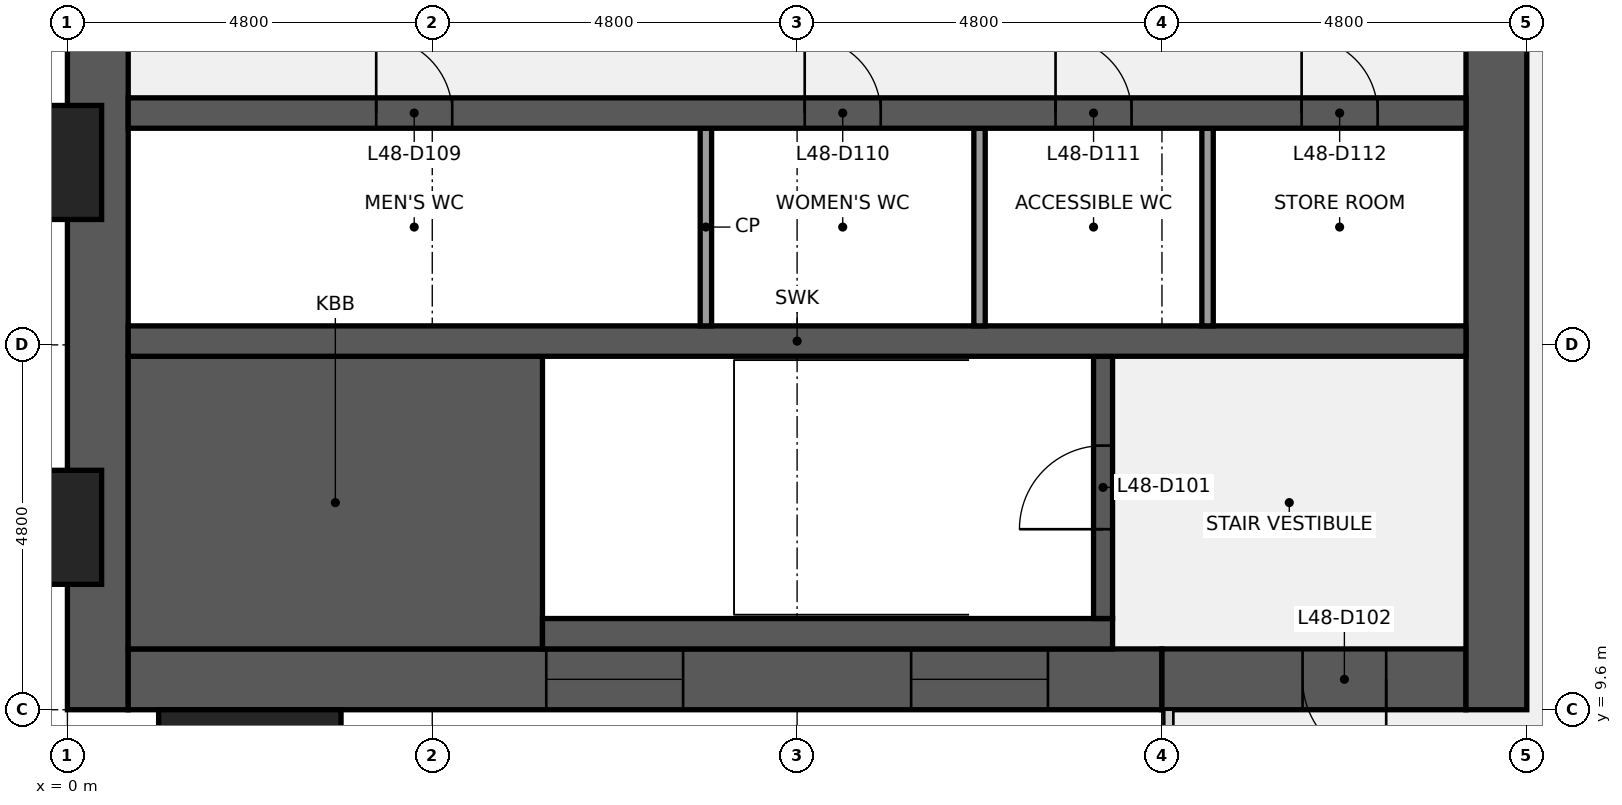
"""IFC4 building model, lengths in metres.
Left out: names, types, materials, properties, quantities, classifications, styles, units other than length and angle.
Written with IfcOpenShell. Run it as: python <this file> out.ifc"""

import sys

from ifc_helpers import new_model, si_unit, direction, frame, frame_2d, origin, origin_2d, place, context, subcontext, project, spatial, rectangle, extrude, element, fill, save


model = new_model("IFC4")
c1 = context("Model", 3, precision=1e-05, world=origin(), true_north=direction((0.0, 1.0)))
c2 = subcontext(c1, "Body", "Model", "MODEL_VIEW")
j1 = project(units=[si_unit("LENGTHUNIT", "METRE"), si_unit("PLANEANGLEUNIT", "RADIAN")], contexts=[c1])
p1 = place(None, origin())
s1 = spatial("IfcSite", under=j1, at=p1, CompositionType="ELEMENT")
p2 = place(p1, origin())
s2 = spatial("IfcBuilding", under=s1, at=p2, CompositionType="ELEMENT")
p3 = place(p2, frame((0.0, 0.0, 221.2)))
s3 = spatial("IfcBuildingStorey", under=s2, at=p3, CompositionType="ELEMENT", Elevation=221.2)
p4 = place(p3, frame((0.4, 9.6, 0.0), z_axis=(0.0, 0.0, 1.0), x_axis=(0.0, 1.0, 0.0)))
e1 = element("IfcWall", 1, at=p4, inside=s3, PredefinedType="SHEAR", context=c2, shape_type="SweptSolid", body=[
    extrude(rectangle(XDim=28.8, YDim=0.8, at=frame_2d((14.4, 0.0))), origin(), (0.0, 0.0, 1.0), 3.84),
])
p5 = place(p4, frame((8.85, 0.0, 0.9)))
e2 = element("IfcOpeningElement", 2, at=p5, cuts=e1, PredefinedType="OPENING", context=c2, shape_type="SweptSolid", body=[
    extrude(rectangle(XDim=1.5, YDim=1.5, at=frame_2d((0.75, 0.75))), frame((0.0, 0.41, 0.0), z_axis=(0.0, -1.0, 0.0), x_axis=(1.0, 0.0, 0.0)), (0.0, 0.0, 1.0), 0.82),
])
p6 = place(p4, frame((18.45, 0.0, 0.9)))
e3 = element("IfcOpeningElement", 3, at=p6, cuts=e1, PredefinedType="OPENING", context=c2, shape_type="SweptSolid", body=[
    extrude(rectangle(XDim=1.5, YDim=1.5, at=frame_2d((0.75, 0.75))), frame((0.0, 0.41, 0.0), z_axis=(0.0, -1.0, 0.0), x_axis=(1.0, 0.0, 0.0)), (0.0, 0.0, 1.0), 0.82),
])
p7 = place(p3, frame((14.4, 10.0, 0.0), z_axis=(0.0, 0.0, 1.0), x_axis=(-1.0, 0.0, 0.0)))
e4 = element("IfcWall", 4, at=p7, inside=s3, PredefinedType="SHEAR", context=c2, shape_type="SweptSolid", body=[
    extrude(rectangle(XDim=13.6, YDim=0.8, at=frame_2d((6.8, 0.0))), origin(), (0.0, 0.0, 1.0), 3.84),
])
p8 = place(p7, frame((6.3, 0.0, 0.9)))
e5 = element("IfcOpeningElement", 5, at=p8, cuts=e4, PredefinedType="OPENING", context=c2, shape_type="SweptSolid", body=[
    extrude(rectangle(XDim=1.8, YDim=1.5, at=frame_2d((0.9, 0.75))), frame((0.0, 0.41, 0.0), z_axis=(0.0, -1.0, 0.0), x_axis=(1.0, 0.0, 0.0)), (0.0, 0.0, 1.0), 0.82),
])
p9 = place(p7, frame((1.5, 0.0, 0.9)))
e6 = element("IfcOpeningElement", 6, at=p9, cuts=e4, PredefinedType="OPENING", context=c2, shape_type="SweptSolid", body=[
    extrude(rectangle(XDim=1.8, YDim=1.5, at=frame_2d((0.9, 0.75))), frame((0.0, 0.41, 0.0), z_axis=(0.0, -1.0, 0.0), x_axis=(1.0, 0.0, 0.0)), (0.0, 0.0, 1.0), 0.82),
])
p10 = place(p3, frame((18.4, 10.0, 0.0), z_axis=(0.0, 0.0, 1.0), x_axis=(-1.0, 0.0, 0.0)))
e7 = element("IfcWall", 7, at=p10, inside=s3, PredefinedType="SHEAR", context=c2, shape_type="SweptSolid", body=[
    extrude(rectangle(XDim=4.0, YDim=0.8, at=frame_2d((2.0, 0.0))), origin(), (0.0, 0.0, 1.0), 3.84),
])
p11 = place(p10, frame((1.05, 0.0, 0.0)))
e8 = element("IfcOpeningElement", 8, at=p11, cuts=e7, PredefinedType="OPENING", context=c2, shape_type="SweptSolid", body=[
    extrude(rectangle(XDim=1.1, YDim=2.1, at=frame_2d((0.55, 1.05))), frame((0.0, 0.41, 0.0), z_axis=(0.0, -1.0, 0.0), x_axis=(1.0, 0.0, 0.0)), (0.0, 0.0, 1.0), 0.82),
])
p12 = place(p3, frame((18.8, 38.4, 0.0), z_axis=(0.0, 0.0, 1.0), x_axis=(0.0, -1.0, 0.0)))
e9 = element("IfcWall", 9, at=p12, inside=s3, PredefinedType="SHEAR", context=c2, shape_type="SweptSolid", body=[
    extrude(rectangle(XDim=28.8, YDim=0.8, at=frame_2d((14.4, 0.0))), origin(), (0.0, 0.0, 1.0), 3.84),
])
p13 = place(p12, frame((18.3, 0.0, 0.0)))
e10 = element("IfcOpeningElement", 10, at=p13, cuts=e9, PredefinedType="OPENING", context=c2, shape_type="SweptSolid", body=[
    extrude(rectangle(XDim=1.8, YDim=2.1, at=frame_2d((0.9, 1.05))), frame((0.0, 0.41, 0.0), z_axis=(0.0, -1.0, 0.0), x_axis=(1.0, 0.0, 0.0)), (0.0, 0.0, 1.0), 0.82),
])
p14 = place(p12, frame((8.7, 0.0, 0.0)))
e11 = element("IfcOpeningElement", 11, at=p14, cuts=e9, PredefinedType="OPENING", context=c2, shape_type="SweptSolid", body=[
    extrude(rectangle(XDim=1.8, YDim=2.1, at=frame_2d((0.9, 1.05))), frame((0.0, 0.41, 0.0), z_axis=(0.0, -1.0, 0.0), x_axis=(1.0, 0.0, 0.0)), (0.0, 0.0, 1.0), 0.82),
])
p15 = place(p3, frame((0.8, 12.325, 0.0), z_axis=(0.0, 0.0, 1.0), x_axis=(1.0, 0.0, 0.0)))
e12 = element("IfcWall", 12, at=p15, inside=s3, PredefinedType="SHEAR", context=c2, shape_type="SweptSolid", body=[
    extrude(rectangle(XDim=5.45, YDim=3.85, at=frame_2d((2.725, 0.0))), origin(), (0.0, 0.0, 1.0), 3.84),
])
p16 = place(p3, frame((6.25, 10.6, 0.0), z_axis=(0.0, 0.0, 1.0), x_axis=(1.0, 0.0, 0.0)))
e13 = element("IfcWall", 13, at=p16, inside=s3, PredefinedType="SHEAR", context=c2, shape_type="SweptSolid", body=[
    extrude(rectangle(XDim=7.5, YDim=0.4, at=frame_2d((3.75, 0.0))), origin(), (0.0, 0.0, 1.0), 3.84),
])
p17 = place(p3, frame((13.625, 10.8, 0.0), z_axis=(0.0, 0.0, 1.0), x_axis=(0.0, 1.0, 0.0)))
e14 = element("IfcWall", 14, at=p17, inside=s3, PredefinedType="SHEAR", context=c2, shape_type="SweptSolid", body=[
    extrude(rectangle(XDim=3.45, YDim=0.25, at=frame_2d((1.725, 0.0))), origin(), (0.0, 0.0, 1.0), 3.84),
])
p18 = place(p17, frame((1.175, 0.0, 0.0)))
e15 = element("IfcOpeningElement", 15, at=p18, cuts=e14, PredefinedType="OPENING", context=c2, shape_type="SweptSolid", body=[
    extrude(rectangle(XDim=1.1, YDim=2.1, at=frame_2d((0.55, 1.05))), frame((0.0, 0.135, 0.0), z_axis=(0.0, -1.0, 0.0), x_axis=(1.0, 0.0, 0.0)), (0.0, 0.0, 1.0), 0.27),
])
p19 = place(p3, frame((0.8, 14.45, 0.0), z_axis=(0.0, 0.0, 1.0), x_axis=(1.0, 0.0, 0.0)))
e16 = element("IfcWall", 16, at=p19, inside=s3, PredefinedType="SHEAR", context=c2, shape_type="SweptSolid", body=[
    extrude(rectangle(XDim=17.6, YDim=0.4, at=frame_2d((8.8, 0.0))), origin(), (0.0, 0.0, 1.0), 3.84),
])
for number, where, z_axis, x_axis in (
    (17, (8.4, 14.65, 0.0), (0.0, 0.0, 1.0), (0.0, 1.0, 0.0)),
    (18, (12.0, 14.65, 0.0), (0.0, 0.0, 1.0), (0.0, 1.0, 0.0)),
    (19, (15.0, 14.65, 0.0), (0.0, 0.0, 1.0), (0.0, 1.0, 0.0)),
):
    element("IfcWall", number, at=place(p3, frame(where, z_axis=z_axis, x_axis=x_axis)), inside=s3, PredefinedType="PARTITIONING", context=c2, shape_type="SweptSolid", body=[
        extrude(rectangle(XDim=2.6, YDim=0.15, at=frame_2d((1.3, 0.0))), origin(), (0.0, 0.0, 1.0), 3.84),
    ])
p20 = place(p3, frame((0.8, 17.45, 0.0), z_axis=(0.0, 0.0, 1.0), x_axis=(1.0, 0.0, 0.0)))
e20 = element("IfcWall", 20, at=p20, inside=s3, PredefinedType="SHEAR", context=c2, shape_type="SweptSolid", body=[
    extrude(rectangle(XDim=17.6, YDim=0.4, at=frame_2d((8.8, 0.0))), origin(), (0.0, 0.0, 1.0), 3.84),
])
p21 = place(p20, frame((3.262, 0.0, 0.0)))
e21 = element("IfcOpeningElement", 21, at=p21, cuts=e20, PredefinedType="OPENING", context=c2, shape_type="SweptSolid", body=[
    extrude(rectangle(XDim=1.0, YDim=2.1, at=frame_2d((0.5, 1.05))), frame((0.0, 0.21, 0.0), z_axis=(0.0, -1.0, 0.0), x_axis=(1.0, 0.0, 0.0)), (0.0, 0.0, 1.0), 0.42),
])
p22 = place(p20, frame((8.9, 0.0, 0.0)))
e22 = element("IfcOpeningElement", 22, at=p22, cuts=e20, PredefinedType="OPENING", context=c2, shape_type="SweptSolid", body=[
    extrude(rectangle(XDim=1.0, YDim=2.1, at=frame_2d((0.5, 1.05))), frame((0.0, 0.21, 0.0), z_axis=(0.0, -1.0, 0.0), x_axis=(1.0, 0.0, 0.0)), (0.0, 0.0, 1.0), 0.42),
])
p23 = place(p20, frame((12.2, 0.0, 0.0)))
e23 = element("IfcOpeningElement", 23, at=p23, cuts=e20, PredefinedType="OPENING", context=c2, shape_type="SweptSolid", body=[
    extrude(rectangle(XDim=1.0, YDim=2.1, at=frame_2d((0.5, 1.05))), frame((0.0, 0.21, 0.0), z_axis=(0.0, -1.0, 0.0), x_axis=(1.0, 0.0, 0.0)), (0.0, 0.0, 1.0), 0.42),
])
p24 = place(p20, frame((15.438, 0.0, 0.0)))
e24 = element("IfcOpeningElement", 24, at=p24, cuts=e20, PredefinedType="OPENING", context=c2, shape_type="SweptSolid", body=[
    extrude(rectangle(XDim=1.0, YDim=2.1, at=frame_2d((0.5, 1.05))), frame((0.0, 0.21, 0.0), z_axis=(0.0, -1.0, 0.0), x_axis=(1.0, 0.0, 0.0)), (0.0, 0.0, 1.0), 0.42),
])
for number, where, z_axis, x_axis in (
    (25, (-0.75, 12.0, 0.0), (0.0, 0.0, 1.0), (0.0, 1.0, 0.0)),
    (26, (-0.75, 16.8, 0.0), (0.0, 0.0, 1.0), (0.0, 1.0, 0.0)),
    (27, (2.4, 8.85, 0.0), (0.0, 0.0, 1.0), (1.0, 0.0, 0.0)),
):
    element("IfcColumn", number, at=place(p3, frame(where, z_axis=z_axis, x_axis=x_axis)), inside=s3, PredefinedType="PILASTER", context=c2, shape_type="SweptSolid", body=[
        extrude(rectangle(XDim=2.4, YDim=1.5, at=origin_2d()), origin(), (0.0, 0.0, 1.0), 4.0),
    ])
p25 = place(p18, origin())
e28 = element("IfcDoor", 28, at=p25, inside=s3, OperationType="SINGLE_SWING_LEFT", PredefinedType="DOOR", context=c2, shape_type="SweptSolid", body=[
    extrude(rectangle(XDim=1.1, YDim=2.1, at=frame_2d((0.55, 1.05))), frame((0.0, 0.025, 0.0), z_axis=(0.0, -1.0, 0.0), x_axis=(1.0, 0.0, 0.0)), (0.0, 0.0, 1.0), 0.05),
])
fill(e15, e28)
p26 = place(p11, origin())
e29 = element("IfcDoor", 29, at=p26, inside=s3, OperationType="SINGLE_SWING_LEFT", PredefinedType="DOOR", context=c2, shape_type="SweptSolid", body=[
    extrude(rectangle(XDim=1.1, YDim=2.1, at=frame_2d((0.55, 1.05))), frame((0.0, 0.025, 0.0), z_axis=(0.0, -1.0, 0.0), x_axis=(1.0, 0.0, 0.0)), (0.0, 0.0, 1.0), 0.05),
])
fill(e8, e29)
p27 = place(p21, origin())
e30 = element("IfcDoor", 30, at=p27, inside=s3, OperationType="SINGLE_SWING_LEFT", PredefinedType="DOOR", context=c2, shape_type="SweptSolid", body=[
    extrude(rectangle(XDim=1.0, YDim=2.1, at=frame_2d((0.5, 1.05))), frame((0.0, 0.025, 0.0), z_axis=(0.0, -1.0, 0.0), x_axis=(1.0, 0.0, 0.0)), (0.0, 0.0, 1.0), 0.05),
])
fill(e21, e30)
p28 = place(p22, origin())
e31 = element("IfcDoor", 31, at=p28, inside=s3, OperationType="SINGLE_SWING_LEFT", PredefinedType="DOOR", context=c2, shape_type="SweptSolid", body=[
    extrude(rectangle(XDim=1.0, YDim=2.1, at=frame_2d((0.5, 1.05))), frame((0.0, 0.025, 0.0), z_axis=(0.0, -1.0, 0.0), x_axis=(1.0, 0.0, 0.0)), (0.0, 0.0, 1.0), 0.05),
])
fill(e22, e31)
p29 = place(p23, origin())
e32 = element("IfcDoor", 32, at=p29, inside=s3, OperationType="SINGLE_SWING_LEFT", PredefinedType="DOOR", context=c2, shape_type="SweptSolid", body=[
    extrude(rectangle(XDim=1.0, YDim=2.1, at=frame_2d((0.5, 1.05))), frame((0.0, 0.025, 0.0), z_axis=(0.0, -1.0, 0.0), x_axis=(1.0, 0.0, 0.0)), (0.0, 0.0, 1.0), 0.05),
])
fill(e23, e32)
p30 = place(p24, origin())
e33 = element("IfcDoor", 33, at=p30, inside=s3, OperationType="SINGLE_SWING_LEFT", PredefinedType="DOOR", context=c2, shape_type="SweptSolid", body=[
    extrude(rectangle(XDim=1.0, YDim=2.1, at=frame_2d((0.5, 1.05))), frame((0.0, 0.025, 0.0), z_axis=(0.0, -1.0, 0.0), x_axis=(1.0, 0.0, 0.0)), (0.0, 0.0, 1.0), 0.05),
])
fill(e24, e33)
p31 = place(p8, origin())
e34 = element("IfcWindow", 34, at=p31, inside=s3, PartitioningType="SINGLE_PANEL", PredefinedType="WINDOW", context=c2, shape_type="SweptSolid", body=[
    extrude(rectangle(XDim=1.8, YDim=1.5, at=frame_2d((0.9, 0.75))), frame((0.0, 0.03, 0.0), z_axis=(0.0, -1.0, 0.0), x_axis=(1.0, 0.0, 0.0)), (0.0, 0.0, 1.0), 0.06),
])
fill(e5, e34)
p32 = place(p9, origin())
e35 = element("IfcWindow", 35, at=p32, inside=s3, PartitioningType="SINGLE_PANEL", PredefinedType="WINDOW", context=c2, shape_type="SweptSolid", body=[
    extrude(rectangle(XDim=1.8, YDim=1.5, at=frame_2d((0.9, 0.75))), frame((0.0, 0.03, 0.0), z_axis=(0.0, -1.0, 0.0), x_axis=(1.0, 0.0, 0.0)), (0.0, 0.0, 1.0), 0.06),
])
fill(e6, e35)
save(model, sys.argv[1])
